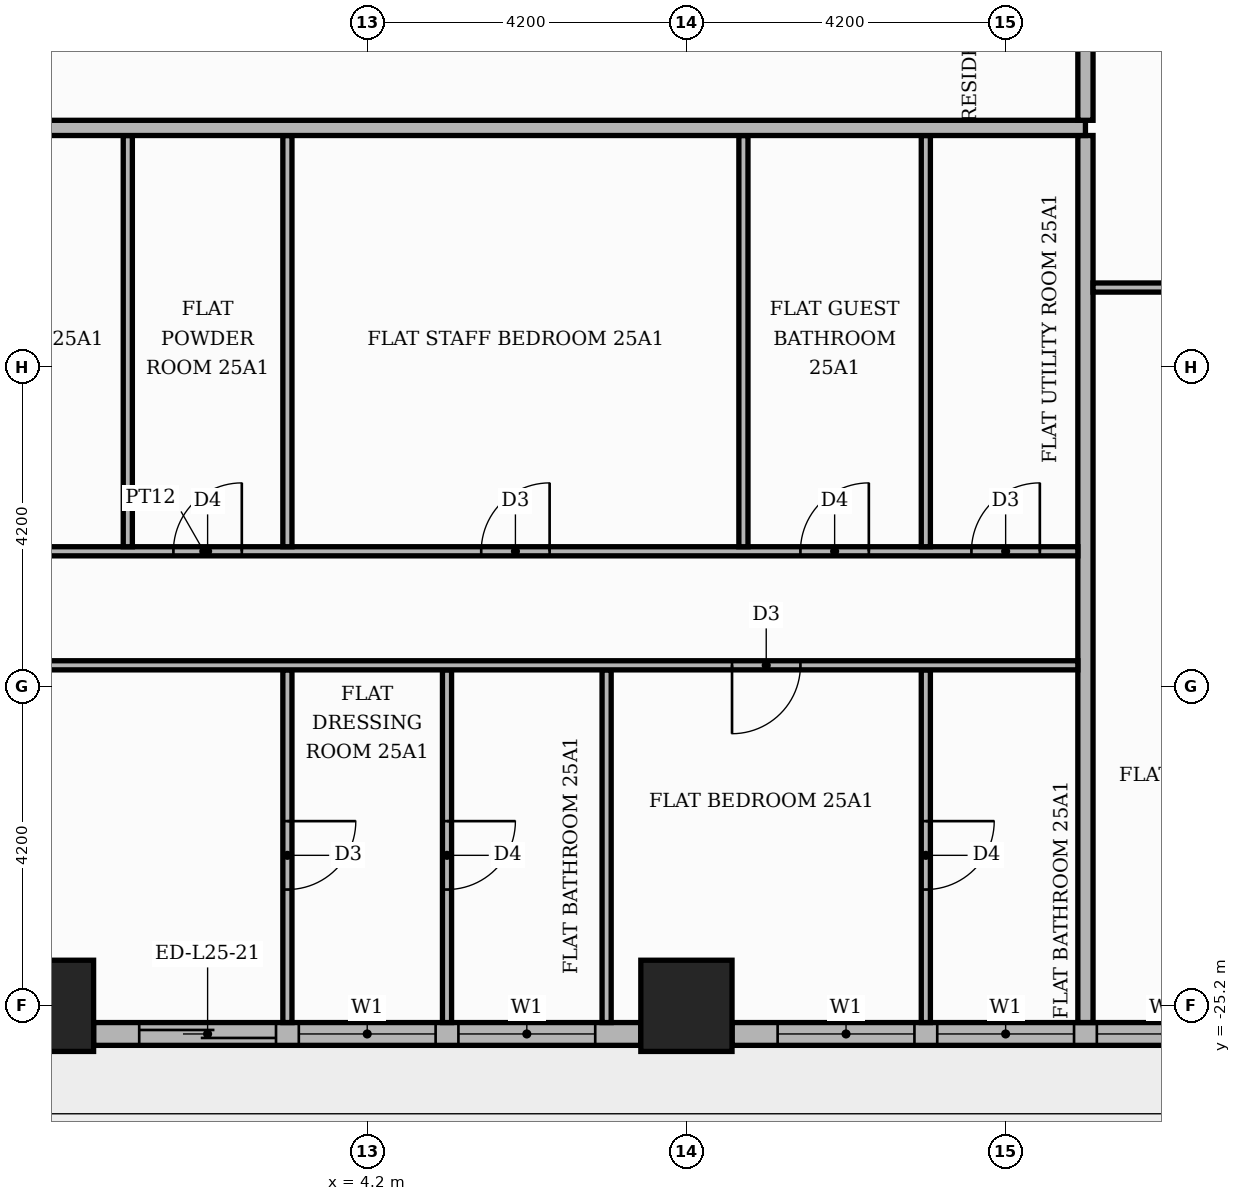
"""IFC4 building model, lengths in metres.
Left out: names, types, materials, properties, quantities, classifications, styles, units other than length and angle.
Written with IfcOpenShell. Run it as: python <this file> out.ifc"""

import sys

from ifc_helpers import new_model, si_unit, direction, frame, frame_2d, origin, origin_2d, place, context, subcontext, project, spatial, rectangle, extrude, element, fill, save


model = new_model("IFC4")
c1 = context("Model", 3, precision=1e-05, world=origin(), true_north=direction((0.0, 1.0)))
c2 = subcontext(c1, "Body", "Model", "MODEL_VIEW")
j1 = project(units=[si_unit("LENGTHUNIT", "METRE"), si_unit("PLANEANGLEUNIT", "RADIAN")], contexts=[c1])
p1 = place(None, origin())
s1 = spatial("IfcSite", under=j1, at=p1, CompositionType="ELEMENT")
p2 = place(p1, origin())
s2 = spatial("IfcBuilding", under=s1, at=p2, CompositionType="ELEMENT")
p3 = place(p2, frame((0.0, 0.0, 106.5)))
s3 = spatial("IfcBuildingStorey", under=s2, at=p3, CompositionType="ELEMENT", Elevation=106.5)
for number, where, z_axis, x_axis in (
    (1, (0.0, -25.2, 0.0), (0.0, 0.0, 1.0), (1.0, 0.0, 0.0)),
    (2, (8.4, -25.2, 0.0), (0.0, 0.0, 1.0), (1.0, 0.0, 0.0)),
):
    element("IfcColumn", number, at=place(p3, frame(where, z_axis=z_axis, x_axis=x_axis)), inside=s3, PredefinedType="COLUMN", context=c2, shape_type="SweptSolid", body=[
        extrude(rectangle(XDim=1.2, YDim=1.2, at=origin_2d()), origin(), (0.0, 0.0, 1.0), 3.9),
    ])
p4 = place(p3, frame((0.6, -25.57, 0.0), z_axis=(0.0, 0.0, 1.0), x_axis=(1.0, 0.0, 0.0)))
e3 = element("IfcWall", 3, at=p4, inside=s3, PredefinedType="STANDARD", context=c2, shape_type="SweptSolid", body=[
    extrude(rectangle(XDim=7.2, YDim=0.3, at=frame_2d((3.6, 0.0))), origin(), (0.0, 0.0, 1.0), 3.48),
])
p5 = place(p4, frame((0.6, 0.0, 0.0)))
e4 = element("IfcOpeningElement", 4, at=p5, cuts=e3, PredefinedType="OPENING", context=c2, shape_type="SweptSolid", body=[
    extrude(rectangle(XDim=1.8, YDim=2.4, at=frame_2d((0.9, 1.2))), frame((0.0, 0.16, 0.0), z_axis=(0.0, -1.0, 0.0), x_axis=(1.0, 0.0, 0.0)), (0.0, 0.0, 1.0), 0.32),
])
p6 = place(p4, frame((2.7, 0.0, 0.9)))
e5 = element("IfcOpeningElement", 5, at=p6, cuts=e3, PredefinedType="OPENING", context=c2, shape_type="SweptSolid", body=[
    extrude(rectangle(XDim=1.8, YDim=2.1, at=frame_2d((0.9, 1.05))), frame((0.0, 0.16, 0.0), z_axis=(0.0, -1.0, 0.0), x_axis=(1.0, 0.0, 0.0)), (0.0, 0.0, 1.0), 0.32),
])
p7 = place(p4, frame((4.8, 0.0, 0.9)))
e6 = element("IfcOpeningElement", 6, at=p7, cuts=e3, PredefinedType="OPENING", context=c2, shape_type="SweptSolid", body=[
    extrude(rectangle(XDim=1.8, YDim=2.1, at=frame_2d((0.9, 1.05))), frame((0.0, 0.16, 0.0), z_axis=(0.0, -1.0, 0.0), x_axis=(1.0, 0.0, 0.0)), (0.0, 0.0, 1.0), 0.32),
])
p8 = place(p3, frame((9.0, -25.57, 0.0), z_axis=(0.0, 0.0, 1.0), x_axis=(1.0, 0.0, 0.0)))
e7 = element("IfcWall", 7, at=p8, inside=s3, PredefinedType="STANDARD", context=c2, shape_type="SweptSolid", body=[
    extrude(rectangle(XDim=7.2, YDim=0.3, at=frame_2d((3.6, 0.0))), origin(), (0.0, 0.0, 1.0), 3.48),
])
p9 = place(p8, frame((0.6, 0.0, 0.9)))
e8 = element("IfcOpeningElement", 8, at=p9, cuts=e7, PredefinedType="OPENING", context=c2, shape_type="SweptSolid", body=[
    extrude(rectangle(XDim=1.8, YDim=2.1, at=frame_2d((0.9, 1.05))), frame((0.0, 0.16, 0.0), z_axis=(0.0, -1.0, 0.0), x_axis=(1.0, 0.0, 0.0)), (0.0, 0.0, 1.0), 0.32),
])
p10 = place(p8, frame((2.7, 0.0, 0.9)))
e9 = element("IfcOpeningElement", 9, at=p10, cuts=e7, PredefinedType="OPENING", context=c2, shape_type="SweptSolid", body=[
    extrude(rectangle(XDim=1.8, YDim=2.1, at=frame_2d((0.9, 1.05))), frame((0.0, 0.16, 0.0), z_axis=(0.0, -1.0, 0.0), x_axis=(1.0, 0.0, 0.0)), (0.0, 0.0, 1.0), 0.32),
])
p11 = place(p8, frame((4.8, 0.0, 0.9)))
e10 = element("IfcOpeningElement", 10, at=p11, cuts=e7, PredefinedType="OPENING", context=c2, shape_type="SweptSolid", body=[
    extrude(rectangle(XDim=1.8, YDim=2.1, at=frame_2d((0.9, 1.05))), frame((0.0, 0.16, 0.0), z_axis=(0.0, -1.0, 0.0), x_axis=(1.0, 0.0, 0.0)), (0.0, 0.0, 1.0), 0.32),
])
p12 = place(p3, frame((3.15, -25.42, 0.0), z_axis=(0.0, 0.0, 1.0), x_axis=(0.0, 1.0, 0.0)))
e11 = element("IfcWall", 11, at=p12, inside=s3, PredefinedType="PARTITIONING", context=c2, shape_type="SweptSolid", body=[
    extrude(rectangle(XDim=4.64, YDim=0.12, at=frame_2d((2.32, 0.0))), origin(), (0.0, 0.0, 1.0), 3.48),
])
p13 = place(p12, frame((1.75, 0.0, 0.0)))
e12 = element("IfcOpeningElement", 12, at=p13, cuts=e11, PredefinedType="OPENING", context=c2, shape_type="SweptSolid", body=[
    extrude(rectangle(XDim=0.9, YDim=2.1, at=frame_2d((0.45, 1.05))), frame((0.0, 0.07, 0.0), z_axis=(0.0, -1.0, 0.0), x_axis=(1.0, 0.0, 0.0)), (0.0, 0.0, 1.0), 0.14),
])
p14 = place(p3, frame((5.25, -25.42, 0.0), z_axis=(0.0, 0.0, 1.0), x_axis=(0.0, 1.0, 0.0)))
e13 = element("IfcWall", 13, at=p14, inside=s3, PredefinedType="PARTITIONING", context=c2, shape_type="SweptSolid", body=[
    extrude(rectangle(XDim=4.64, YDim=0.12, at=frame_2d((2.32, 0.0))), origin(), (0.0, 0.0, 1.0), 3.48),
])
p15 = place(p14, frame((1.75, 0.0, 0.0)))
e14 = element("IfcOpeningElement", 14, at=p15, cuts=e13, PredefinedType="OPENING", context=c2, shape_type="SweptSolid", body=[
    extrude(rectangle(XDim=0.9, YDim=2.1, at=frame_2d((0.45, 1.05))), frame((0.0, 0.07, 0.0), z_axis=(0.0, -1.0, 0.0), x_axis=(1.0, 0.0, 0.0)), (0.0, 0.0, 1.0), 0.14),
])
p16 = place(p3, frame((7.35, -25.42, 0.0), z_axis=(0.0, 0.0, 1.0), x_axis=(0.0, 1.0, 0.0)))
e15 = element("IfcWall", 15, at=p16, inside=s3, PredefinedType="PARTITIONING", context=c2, shape_type="SweptSolid", body=[
    extrude(rectangle(XDim=4.64, YDim=0.12, at=frame_2d((2.32, 0.0))), origin(), (0.0, 0.0, 1.0), 3.48),
])
p17 = place(p3, frame((11.55, -25.42, 0.0), z_axis=(0.0, 0.0, 1.0), x_axis=(0.0, 1.0, 0.0)))
e16 = element("IfcWall", 16, at=p17, inside=s3, PredefinedType="PARTITIONING", context=c2, shape_type="SweptSolid", body=[
    extrude(rectangle(XDim=4.64, YDim=0.12, at=frame_2d((2.32, 0.0))), origin(), (0.0, 0.0, 1.0), 3.48),
])
p18 = place(p17, frame((1.75, 0.0, 0.0)))
e17 = element("IfcOpeningElement", 17, at=p18, cuts=e16, PredefinedType="OPENING", context=c2, shape_type="SweptSolid", body=[
    extrude(rectangle(XDim=0.9, YDim=2.1, at=frame_2d((0.45, 1.05))), frame((0.0, 0.07, 0.0), z_axis=(0.0, -1.0, 0.0), x_axis=(1.0, 0.0, 0.0)), (0.0, 0.0, 1.0), 0.14),
])
p19 = place(p3, frame((13.65, -25.42, 0.0), z_axis=(0.0, 0.0, 1.0), x_axis=(0.0, 1.0, 0.0)))
e18 = element("IfcWall", 18, at=p19, inside=s3, PredefinedType="PARTITIONING", context=c2, shape_type="SweptSolid", body=[
    extrude(rectangle(XDim=11.67, YDim=0.2, at=frame_2d((5.835, 0.0))), origin(), (0.0, 0.0, 1.0), 3.48),
])
p20 = place(p3, frame((-25.42, -20.72, 0.0), z_axis=(0.0, 0.0, 1.0), x_axis=(1.0, 0.0, 0.0)))
e19 = element("IfcWall", 19, at=p20, inside=s3, PredefinedType="PARTITIONING", context=c2, shape_type="SweptSolid", body=[
    extrude(rectangle(XDim=38.97, YDim=0.12, at=frame_2d((19.485, 0.0))), origin(), (0.0, 0.0, 1.0), 3.48),
])
p21 = place(p20, frame((10.22, 0.0, 0.0)))
e20 = element("IfcOpeningElement", 20, at=p21, cuts=e19, PredefinedType="OPENING", context=c2, shape_type="SweptSolid", body=[
    extrude(rectangle(XDim=1.0, YDim=2.1, at=frame_2d((0.5, 1.05))), frame((0.0, 0.07, 0.0), z_axis=(0.0, -1.0, 0.0), x_axis=(1.0, 0.0, 0.0)), (0.0, 0.0, 1.0), 0.14),
])
p22 = place(p20, frame((15.47, 0.0, 0.0)))
e21 = element("IfcOpeningElement", 21, at=p22, cuts=e19, PredefinedType="OPENING", context=c2, shape_type="SweptSolid", body=[
    extrude(rectangle(XDim=1.0, YDim=2.1, at=frame_2d((0.5, 1.05))), frame((0.0, 0.07, 0.0), z_axis=(0.0, -1.0, 0.0), x_axis=(1.0, 0.0, 0.0)), (0.0, 0.0, 1.0), 0.14),
])
p23 = place(p20, frame((23.92, 0.0, 0.0)))
e22 = element("IfcOpeningElement", 22, at=p23, cuts=e19, PredefinedType="OPENING", context=c2, shape_type="SweptSolid", body=[
    extrude(rectangle(XDim=0.9, YDim=2.1, at=frame_2d((0.45, 1.05))), frame((0.0, 0.07, 0.0), z_axis=(0.0, -1.0, 0.0), x_axis=(1.0, 0.0, 0.0)), (0.0, 0.0, 1.0), 0.14),
])
p24 = place(p20, frame((34.42, 0.0, 0.0)))
e23 = element("IfcOpeningElement", 23, at=p24, cuts=e19, PredefinedType="OPENING", context=c2, shape_type="SweptSolid", body=[
    extrude(rectangle(XDim=0.9, YDim=2.1, at=frame_2d((0.45, 1.05))), frame((0.0, 0.07, 0.0), z_axis=(0.0, -1.0, 0.0), x_axis=(1.0, 0.0, 0.0)), (0.0, 0.0, 1.0), 0.14),
])
p25 = place(p3, frame((-9.45, -19.22, 0.0), z_axis=(0.0, 0.0, 1.0), x_axis=(1.0, 0.0, 0.0)))
e24 = element("IfcWall", 24, at=p25, inside=s3, PredefinedType="PARTITIONING", context=c2, shape_type="SweptSolid", body=[
    extrude(rectangle(XDim=23.0, YDim=0.12, at=frame_2d((11.5, 0.0))), origin(), (0.0, 0.0, 1.0), 3.48),
])
p26 = place(p25, frame((2.7, 0.0, 0.0)))
e25 = element("IfcOpeningElement", 25, at=p26, cuts=e24, PredefinedType="OPENING", context=c2, shape_type="SweptSolid", body=[
    extrude(rectangle(XDim=0.9, YDim=2.1, at=frame_2d((0.45, 1.05))), frame((0.0, 0.07, 0.0), z_axis=(0.0, -1.0, 0.0), x_axis=(1.0, 0.0, 0.0)), (0.0, 0.0, 1.0), 0.14),
])
p27 = place(p25, frame((7.95, 0.0, 0.0)))
e26 = element("IfcOpeningElement", 26, at=p27, cuts=e24, PredefinedType="OPENING", context=c2, shape_type="SweptSolid", body=[
    extrude(rectangle(XDim=0.9, YDim=2.1, at=frame_2d((0.45, 1.05))), frame((0.0, 0.07, 0.0), z_axis=(0.0, -1.0, 0.0), x_axis=(1.0, 0.0, 0.0)), (0.0, 0.0, 1.0), 0.14),
])
p28 = place(p25, frame((11.1, 0.0, 0.0)))
e27 = element("IfcOpeningElement", 27, at=p28, cuts=e24, PredefinedType="OPENING", context=c2, shape_type="SweptSolid", body=[
    extrude(rectangle(XDim=0.9, YDim=2.1, at=frame_2d((0.45, 1.05))), frame((0.0, 0.07, 0.0), z_axis=(0.0, -1.0, 0.0), x_axis=(1.0, 0.0, 0.0)), (0.0, 0.0, 1.0), 0.14),
])
p29 = place(p25, frame((15.15, 0.0, 0.0)))
e28 = element("IfcOpeningElement", 28, at=p29, cuts=e24, PredefinedType="OPENING", context=c2, shape_type="SweptSolid", body=[
    extrude(rectangle(XDim=0.9, YDim=2.1, at=frame_2d((0.45, 1.05))), frame((0.0, 0.07, 0.0), z_axis=(0.0, -1.0, 0.0), x_axis=(1.0, 0.0, 0.0)), (0.0, 0.0, 1.0), 0.14),
])
p30 = place(p25, frame((19.35, 0.0, 0.0)))
e29 = element("IfcOpeningElement", 29, at=p30, cuts=e24, PredefinedType="OPENING", context=c2, shape_type="SweptSolid", body=[
    extrude(rectangle(XDim=0.9, YDim=2.1, at=frame_2d((0.45, 1.05))), frame((0.0, 0.07, 0.0), z_axis=(0.0, -1.0, 0.0), x_axis=(1.0, 0.0, 0.0)), (0.0, 0.0, 1.0), 0.14),
])
p31 = place(p25, frame((21.6, 0.0, 0.0)))
e30 = element("IfcOpeningElement", 30, at=p31, cuts=e24, PredefinedType="OPENING", context=c2, shape_type="SweptSolid", body=[
    extrude(rectangle(XDim=0.9, YDim=2.1, at=frame_2d((0.45, 1.05))), frame((0.0, 0.07, 0.0), z_axis=(0.0, -1.0, 0.0), x_axis=(1.0, 0.0, 0.0)), (0.0, 0.0, 1.0), 0.14),
])
for number, where, z_axis, x_axis in (
    (31, (1.05, -19.16, 0.0), (0.0, 0.0, 1.0), (0.0, 1.0, 0.0)),
    (32, (3.15, -19.16, 0.0), (0.0, 0.0, 1.0), (0.0, 1.0, 0.0)),
    (33, (9.15, -19.16, 0.0), (0.0, 0.0, 1.0), (0.0, 1.0, 0.0)),
    (34, (11.55, -19.16, 0.0), (0.0, 0.0, 1.0), (0.0, 1.0, 0.0)),
):
    element("IfcWall", number, at=place(p3, frame(where, z_axis=z_axis, x_axis=x_axis)), inside=s3, PredefinedType="PARTITIONING", context=c2, shape_type="SweptSolid", body=[
        extrude(rectangle(XDim=5.41, YDim=0.12, at=frame_2d((2.705, 0.0))), origin(), (0.0, 0.0, 1.0), 3.48),
    ])
p32 = place(p3, frame((13.75, -15.75, 0.0), z_axis=(0.0, 0.0, 1.0), x_axis=(1.0, 0.0, 0.0)))
e35 = element("IfcWall", 35, at=p32, inside=s3, PredefinedType="PARTITIONING", context=c2, shape_type="SweptSolid", body=[
    extrude(rectangle(XDim=6.37, YDim=0.12, at=frame_2d((3.185, 0.0))), origin(), (0.0, 0.0, 1.0), 3.48),
])
p33 = place(p32, frame((2.635, 0.0, 0.0)))
e36 = element("IfcOpeningElement", 36, at=p33, cuts=e35, PredefinedType="OPENING", context=c2, shape_type="SweptSolid", body=[
    extrude(rectangle(XDim=1.0, YDim=2.1, at=frame_2d((0.5, 1.05))), frame((0.0, 0.07, 0.0), z_axis=(0.0, -1.0, 0.0), x_axis=(1.0, 0.0, 0.0)), (0.0, 0.0, 1.0), 0.14),
])
p34 = place(p3, frame((-25.42, -13.65, 0.0), z_axis=(0.0, 0.0, 1.0), x_axis=(1.0, 0.0, 0.0)))
e37 = element("IfcWall", 37, at=p34, inside=s3, PredefinedType="PARTITIONING", context=c2, shape_type="SweptSolid", body=[
    extrude(rectangle(XDim=39.07, YDim=0.2, at=frame_2d((19.535, 0.0))), origin(), (0.0, 0.0, 1.0), 3.48),
])
p35 = place(p34, frame((13.32, 0.0, 0.0)))
e38 = element("IfcOpeningElement", 38, at=p35, cuts=e37, PredefinedType="OPENING", context=c2, shape_type="SweptSolid", body=[
    extrude(rectangle(XDim=1.1, YDim=2.4, at=frame_2d((0.55, 1.2))), frame((0.0, 0.11, 0.0), z_axis=(0.0, -1.0, 0.0), x_axis=(1.0, 0.0, 0.0)), (0.0, 0.0, 1.0), 0.22),
])
p36 = place(p3, frame((13.65, -13.55, 0.0), z_axis=(0.0, 0.0, 1.0), x_axis=(0.0, 1.0, 0.0)))
e39 = element("IfcWall", 39, at=p36, inside=s3, PredefinedType="PARTITIONING", context=c2, shape_type="SweptSolid", body=[
    extrude(rectangle(XDim=8.2, YDim=0.2, at=frame_2d((4.1, 0.0))), origin(), (0.0, 0.0, 1.0), 3.48),
])
p37 = place(p36, frame((1.45, 0.0, 0.0)))
e40 = element("IfcOpeningElement", 40, at=p37, cuts=e39, PredefinedType="OPENING", context=c2, shape_type="SweptSolid", body=[
    extrude(rectangle(XDim=1.1, YDim=2.4, at=frame_2d((0.55, 1.2))), frame((0.0, 0.11, 0.0), z_axis=(0.0, -1.0, 0.0), x_axis=(1.0, 0.0, 0.0)), (0.0, 0.0, 1.0), 0.22),
])
p38 = place(p5, origin())
e41 = element("IfcDoor", 41, at=p38, inside=s3, OperationType="SLIDING_TO_LEFT", PredefinedType="DOOR", context=c2, shape_type="SweptSolid", body=[
    extrude(rectangle(XDim=1.8, YDim=2.4, at=frame_2d((0.9, 1.2))), frame((0.0, 0.025, 0.0), z_axis=(0.0, -1.0, 0.0), x_axis=(1.0, 0.0, 0.0)), (0.0, 0.0, 1.0), 0.05),
])
fill(e4, e41)
p39 = place(p6, origin())
e42 = element("IfcWindow", 42, at=p39, inside=s3, PartitioningType="SINGLE_PANEL", PredefinedType="WINDOW", context=c2, shape_type="SweptSolid", body=[
    extrude(rectangle(XDim=1.8, YDim=2.1, at=frame_2d((0.9, 1.05))), frame((0.0, 0.03, 0.0), z_axis=(0.0, -1.0, 0.0), x_axis=(1.0, 0.0, 0.0)), (0.0, 0.0, 1.0), 0.06),
])
fill(e5, e42)
p40 = place(p7, origin())
e43 = element("IfcWindow", 43, at=p40, inside=s3, PartitioningType="SINGLE_PANEL", PredefinedType="WINDOW", context=c2, shape_type="SweptSolid", body=[
    extrude(rectangle(XDim=1.8, YDim=2.1, at=frame_2d((0.9, 1.05))), frame((0.0, 0.03, 0.0), z_axis=(0.0, -1.0, 0.0), x_axis=(1.0, 0.0, 0.0)), (0.0, 0.0, 1.0), 0.06),
])
fill(e6, e43)
p41 = place(p9, origin())
e44 = element("IfcWindow", 44, at=p41, inside=s3, PartitioningType="SINGLE_PANEL", PredefinedType="WINDOW", context=c2, shape_type="SweptSolid", body=[
    extrude(rectangle(XDim=1.8, YDim=2.1, at=frame_2d((0.9, 1.05))), frame((0.0, 0.03, 0.0), z_axis=(0.0, -1.0, 0.0), x_axis=(1.0, 0.0, 0.0)), (0.0, 0.0, 1.0), 0.06),
])
fill(e8, e44)
p42 = place(p10, origin())
e45 = element("IfcWindow", 45, at=p42, inside=s3, PartitioningType="SINGLE_PANEL", PredefinedType="WINDOW", context=c2, shape_type="SweptSolid", body=[
    extrude(rectangle(XDim=1.8, YDim=2.1, at=frame_2d((0.9, 1.05))), frame((0.0, 0.03, 0.0), z_axis=(0.0, -1.0, 0.0), x_axis=(1.0, 0.0, 0.0)), (0.0, 0.0, 1.0), 0.06),
])
fill(e9, e45)
p43 = place(p11, origin())
e46 = element("IfcWindow", 46, at=p43, inside=s3, PartitioningType="SINGLE_PANEL", PredefinedType="WINDOW", context=c2, shape_type="SweptSolid", body=[
    extrude(rectangle(XDim=1.8, YDim=2.1, at=frame_2d((0.9, 1.05))), frame((0.0, 0.03, 0.0), z_axis=(0.0, -1.0, 0.0), x_axis=(1.0, 0.0, 0.0)), (0.0, 0.0, 1.0), 0.06),
])
fill(e10, e46)
p44 = place(p28, origin())
e47 = element("IfcDoor", 47, at=p44, inside=s3, OperationType="SINGLE_SWING_RIGHT", PredefinedType="DOOR", context=c2, shape_type="SweptSolid", body=[
    extrude(rectangle(XDim=0.9, YDim=2.1, at=frame_2d((0.45, 1.05))), frame((0.0, 0.025, 0.0), z_axis=(0.0, -1.0, 0.0), x_axis=(1.0, 0.0, 0.0)), (0.0, 0.0, 1.0), 0.05),
])
fill(e27, e47)
p45 = place(p29, origin())
e48 = element("IfcDoor", 48, at=p45, inside=s3, OperationType="SINGLE_SWING_RIGHT", PredefinedType="DOOR", context=c2, shape_type="SweptSolid", body=[
    extrude(rectangle(XDim=0.9, YDim=2.1, at=frame_2d((0.45, 1.05))), frame((0.0, 0.025, 0.0), z_axis=(0.0, -1.0, 0.0), x_axis=(1.0, 0.0, 0.0)), (0.0, 0.0, 1.0), 0.05),
])
fill(e28, e48)
p46 = place(p30, origin())
e49 = element("IfcDoor", 49, at=p46, inside=s3, OperationType="SINGLE_SWING_RIGHT", PredefinedType="DOOR", context=c2, shape_type="SweptSolid", body=[
    extrude(rectangle(XDim=0.9, YDim=2.1, at=frame_2d((0.45, 1.05))), frame((0.0, 0.025, 0.0), z_axis=(0.0, -1.0, 0.0), x_axis=(1.0, 0.0, 0.0)), (0.0, 0.0, 1.0), 0.05),
])
fill(e29, e49)
p47 = place(p31, origin())
e50 = element("IfcDoor", 50, at=p47, inside=s3, OperationType="SINGLE_SWING_RIGHT", PredefinedType="DOOR", context=c2, shape_type="SweptSolid", body=[
    extrude(rectangle(XDim=0.9, YDim=2.1, at=frame_2d((0.45, 1.05))), frame((0.0, 0.025, 0.0), z_axis=(0.0, -1.0, 0.0), x_axis=(1.0, 0.0, 0.0)), (0.0, 0.0, 1.0), 0.05),
])
fill(e30, e50)
p48 = place(p13, frame((0.9, 0.0, 0.0), z_axis=(0.0, 0.0, 1.0), x_axis=(-1.0, 0.0, 0.0)))
e51 = element("IfcDoor", 51, at=p48, inside=s3, OperationType="SINGLE_SWING_RIGHT", PredefinedType="DOOR", context=c2, shape_type="SweptSolid", body=[
    extrude(rectangle(XDim=0.9, YDim=2.1, at=frame_2d((0.45, 1.05))), frame((0.0, 0.025, 0.0), z_axis=(0.0, -1.0, 0.0), x_axis=(1.0, 0.0, 0.0)), (0.0, 0.0, 1.0), 0.05),
])
fill(e12, e51)
p49 = place(p15, frame((0.9, 0.0, 0.0), z_axis=(0.0, 0.0, 1.0), x_axis=(-1.0, 0.0, 0.0)))
e52 = element("IfcDoor", 52, at=p49, inside=s3, OperationType="SINGLE_SWING_RIGHT", PredefinedType="DOOR", context=c2, shape_type="SweptSolid", body=[
    extrude(rectangle(XDim=0.9, YDim=2.1, at=frame_2d((0.45, 1.05))), frame((0.0, 0.025, 0.0), z_axis=(0.0, -1.0, 0.0), x_axis=(1.0, 0.0, 0.0)), (0.0, 0.0, 1.0), 0.05),
])
fill(e14, e52)
p50 = place(p24, frame((0.9, 0.0, 0.0), z_axis=(0.0, 0.0, 1.0), x_axis=(-1.0, 0.0, 0.0)))
e53 = element("IfcDoor", 53, at=p50, inside=s3, OperationType="SINGLE_SWING_LEFT", PredefinedType="DOOR", context=c2, shape_type="SweptSolid", body=[
    extrude(rectangle(XDim=0.9, YDim=2.1, at=frame_2d((0.45, 1.05))), frame((0.0, 0.025, 0.0), z_axis=(0.0, -1.0, 0.0), x_axis=(1.0, 0.0, 0.0)), (0.0, 0.0, 1.0), 0.05),
])
fill(e23, e53)
p51 = place(p18, frame((0.9, 0.0, 0.0), z_axis=(0.0, 0.0, 1.0), x_axis=(-1.0, 0.0, 0.0)))
e54 = element("IfcDoor", 54, at=p51, inside=s3, OperationType="SINGLE_SWING_RIGHT", PredefinedType="DOOR", context=c2, shape_type="SweptSolid", body=[
    extrude(rectangle(XDim=0.9, YDim=2.1, at=frame_2d((0.45, 1.05))), frame((0.0, 0.025, 0.0), z_axis=(0.0, -1.0, 0.0), x_axis=(1.0, 0.0, 0.0)), (0.0, 0.0, 1.0), 0.05),
])
fill(e17, e54)
save(model, sys.argv[1])
